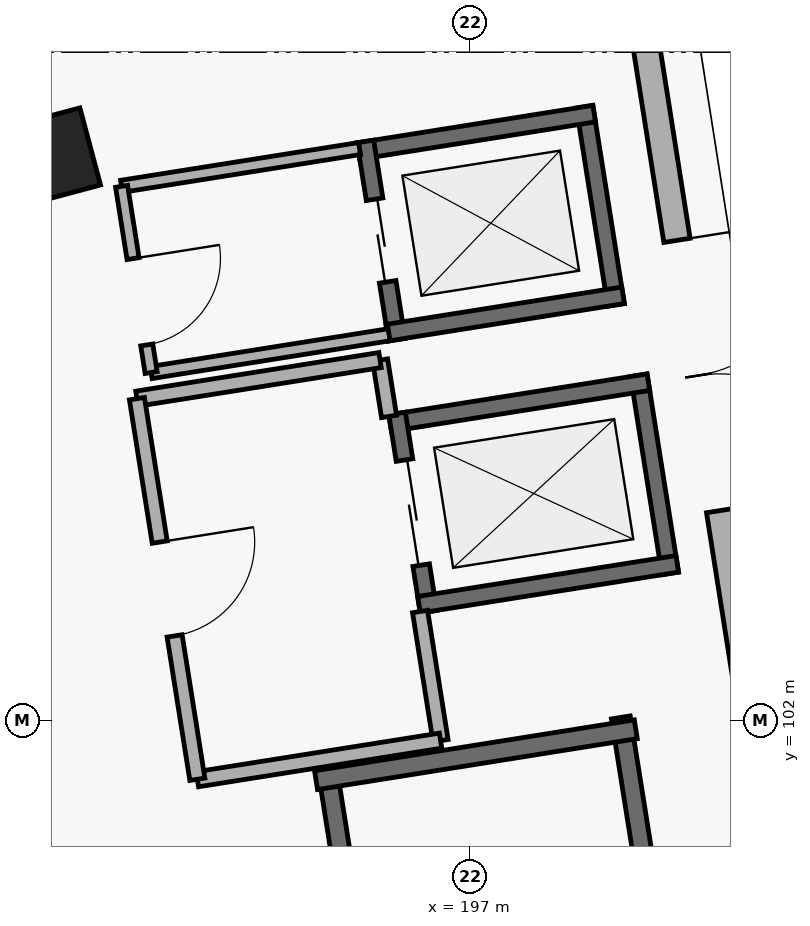
"""IFC4 building model, lengths in metres.
Left out: names, types, materials, properties, quantities, classifications, styles, units other than length and angle.
Written with IfcOpenShell. Run it as: python <this file> out.ifc"""

import sys

from ifc_helpers import new_model, si_unit, direction, frame, frame_2d, origin, origin_2d, place, context, subcontext, project, spatial, rectangle, extrude, element, fill, save


model = new_model("IFC4")
c1 = context("Model", 3, precision=1e-05, world=origin(), true_north=direction((0.0, 1.0)))
c2 = subcontext(c1, "Body", "Model", "MODEL_VIEW")
j1 = project(units=[si_unit("LENGTHUNIT", "METRE"), si_unit("PLANEANGLEUNIT", "RADIAN")], contexts=[c1])
p1 = place(None, origin())
s1 = spatial("IfcSite", under=j1, at=p1, CompositionType="ELEMENT")
p2 = place(p1, origin())
s2 = spatial("IfcBuilding", under=s1, at=p2, CompositionType="ELEMENT")
p3 = place(p2, origin())
s3 = spatial("IfcBuildingStorey", under=s2, at=p3, CompositionType="ELEMENT", Elevation=0.0)
p4 = place(p3, frame((191.496, 109.419, 0.0), z_axis=(0.0, 0.0, 1.0), x_axis=(0.965925826289, 0.258819045103, 0.0)))
e1 = element("IfcColumn", 1, at=p4, inside=s3, PredefinedType="COLUMN", context=c2, shape_type="SweptSolid", body=[
    extrude(rectangle(XDim=1.05, YDim=1.05, at=origin_2d()), origin(), (0.0, 0.0, 1.0), 5.4),
])
p5 = place(p3, frame((199.305, 110.967, 0.0), z_axis=(0.0, 0.0, 1.0), x_axis=(0.155972645656, -0.987761374932, 0.0)))
e2 = element("IfcWall", 2, at=p5, inside=s3, PredefinedType="STANDARD", context=c2, shape_type="SweptSolid", body=[
    extrude(rectangle(XDim=18.671, YDim=0.35, at=frame_2d((9.335, 0.0))), origin(), (0.0, 0.0, 1.0), 4.165),
])
p6 = place(p5, frame((15.84, 0.0, 0.0)))
e3 = element("IfcOpeningElement", 3, at=p6, cuts=e2, PredefinedType="OPENING", context=c2, shape_type="SweptSolid", body=[
    extrude(rectangle(XDim=1.95, YDim=2.25, at=frame_2d((0.975, 1.125))), frame((0.0, 0.185, 0.0), z_axis=(0.0, -1.0, 0.0), x_axis=(1.0, 0.0, 0.0)), (0.0, 0.0, 1.0), 0.37),
])
p7 = place(p5, frame((2.681, 0.0, 0.0)))
e4 = element("IfcOpeningElement", 4, at=p7, cuts=e2, PredefinedType="OPENING", context=c2, shape_type="SweptSolid", body=[
    extrude(rectangle(XDim=3.6, YDim=2.7, at=frame_2d((1.8, 1.35))), frame((0.0, 0.185, 0.0), z_axis=(0.0, -1.0, 0.0), x_axis=(1.0, 0.0, 0.0)), (0.0, 0.0, 1.0), 0.37),
])
p8 = place(p3, frame((198.984, 102.043, 0.0), z_axis=(0.0, 0.0, 1.0), x_axis=(0.157268610044, -0.987555863886, 0.0)))
e5 = element("IfcWall", 5, at=p8, inside=s3, PredefinedType="SHEAR", context=c2, shape_type="SweptSolid", body=[
    extrude(rectangle(XDim=9.55, YDim=0.25, at=frame_2d((4.775, 0.0))), origin(), (0.0, 0.0, 1.0), 5.1),
])
p9 = place(p8, frame((7.19, 0.0, 0.0)))
e6 = element("IfcOpeningElement", 6, at=p9, cuts=e5, PredefinedType="OPENING", context=c2, shape_type="SweptSolid", body=[
    extrude(rectangle(XDim=1.85, YDim=2.3, at=frame_2d((0.925, 1.15))), frame((0.0, 0.135, 0.0), z_axis=(0.0, -1.0, 0.0), x_axis=(1.0, 0.0, 0.0)), (0.0, 0.0, 1.0), 0.27),
])
p10 = place(p3, frame((195.113, 101.427, 0.0), z_axis=(0.0, 0.0, 1.0), x_axis=(0.157243678356, -0.987559833943, 0.0)))
e7 = element("IfcWall", 7, at=p10, inside=s3, PredefinedType="SHEAR", context=c2, shape_type="SweptSolid", body=[
    extrude(rectangle(XDim=9.55, YDim=0.25, at=frame_2d((4.775, 0.0))), origin(), (0.0, 0.0, 1.0), 5.1),
])
p11 = place(p3, frame((199.181, 101.887, 0.0), z_axis=(0.0, 0.0, 1.0), x_axis=(-0.987557660991, -0.157257324847, 0.0)))
e8 = element("IfcWall", 8, at=p11, inside=s3, PredefinedType="SHEAR", context=c2, shape_type="SweptSolid", body=[
    extrude(rectangle(XDim=4.26, YDim=0.25, at=frame_2d((2.13, 0.0))), origin(), (0.0, 0.0, 1.0), 5.1),
])
p12 = place(p3, frame((190.092, 105.159, 0.0), z_axis=(0.0, 0.0, 1.0), x_axis=(0.160694331821, -0.987004220721, 0.0)))
e9 = element("IfcWall", 9, at=p12, inside=s3, PredefinedType="SHEAR", context=c2, shape_type="SweptSolid", body=[
    extrude(rectangle(XDim=9.45, YDim=0.25, at=frame_2d((4.725, 0.0))), origin(), (0.0, 0.0, 1.0), 5.1),
])
p13 = place(p12, frame((7.09, 0.0, 0.0)))
e10 = element("IfcOpeningElement", 10, at=p13, cuts=e9, PredefinedType="OPENING", context=c2, shape_type="SweptSolid", body=[
    extrude(rectangle(XDim=1.85, YDim=2.3, at=frame_2d((0.925, 1.15))), frame((0.0, 0.135, 0.0), z_axis=(0.0, -1.0, 0.0), x_axis=(1.0, 0.0, 0.0)), (0.0, 0.0, 1.0), 0.27),
])
p14 = place(p3, frame((199.635, 103.937, 0.0), z_axis=(0.0, 0.0, 1.0), x_axis=(-0.156807626334, 0.987629165387, 0.0)))
e11 = element("IfcWall", 11, at=p14, inside=s3, PredefinedType="SHEAR", context=c2, shape_type="SweptSolid", body=[
    extrude(rectangle(XDim=2.641, YDim=0.22, at=frame_2d((1.32, 0.0))), origin(), (0.0, 0.0, 1.0), 5.1),
])
p15 = place(p3, frame((199.347, 106.453, 0.0), z_axis=(0.0, 0.0, 1.0), x_axis=(-0.987703627881, -0.156337914372, 0.0)))
e12 = element("IfcWall", 12, at=p15, inside=s3, PredefinedType="SHEAR", context=c2, shape_type="SweptSolid", body=[
    extrude(rectangle(XDim=3.44, YDim=0.22, at=frame_2d((1.72, 0.0))), origin(), (0.0, 0.0, 1.0), 5.1),
])
p16 = place(p3, frame((196.041, 106.041, 0.0), z_axis=(0.0, 0.0, 1.0), x_axis=(0.156807626334, -0.987629165387, 0.0)))
e13 = element("IfcWall", 13, at=p16, inside=s3, PredefinedType="SHEAR", context=c2, shape_type="SweptSolid", body=[
    extrude(rectangle(XDim=2.641, YDim=0.22, at=frame_2d((1.32, 0.0))), origin(), (0.0, 0.0, 1.0), 5.1),
])
p17 = place(p16, frame((0.62, 0.0, 0.0)))
e14 = element("IfcOpeningElement", 14, at=p17, cuts=e13, PredefinedType="OPENING", context=c2, shape_type="SweptSolid", body=[
    extrude(rectangle(XDim=1.4, YDim=2.2, at=frame_2d((0.7, 1.1))), frame((0.0, 0.12, 0.0), z_axis=(0.0, -1.0, 0.0), x_axis=(1.0, 0.0, 0.0)), (0.0, 0.0, 1.0), 0.24),
])
p18 = place(p3, frame((196.329, 103.525, 0.0), z_axis=(0.0, 0.0, 1.0), x_axis=(0.987692667337, 0.156407144619, 0.0)))
e15 = element("IfcWall", 15, at=p18, inside=s3, PredefinedType="SHEAR", context=c2, shape_type="SweptSolid", body=[
    extrude(rectangle(XDim=3.44, YDim=0.22, at=frame_2d((1.72, 0.0))), origin(), (0.0, 0.0, 1.0), 5.1),
])
p19 = place(p3, frame((195.817, 106.744, 0.0), z_axis=(0.0, 0.0, 1.0), x_axis=(0.157482870509, -0.987521719, 0.0)))
e16 = element("IfcWall", 16, at=p19, inside=s3, PredefinedType="PARTITIONING", context=c2, shape_type="SweptSolid", body=[
    extrude(rectangle(XDim=0.75, YDim=0.2, at=frame_2d((0.375, 0.0))), origin(), (0.0, 0.0, 1.0), 5.08),
])
p20 = place(p3, frame((196.343, 103.436, 0.0), z_axis=(0.0, 0.0, 1.0), x_axis=(0.156960903537, -0.987604817101, 0.0)))
e17 = element("IfcWall", 17, at=p20, inside=s3, PredefinedType="PARTITIONING", context=c2, shape_type="SweptSolid", body=[
    extrude(rectangle(XDim=1.72, YDim=0.2, at=frame_2d((0.86, 0.0))), origin(), (0.0, 0.0, 1.0), 5.08),
])
p21 = place(p3, frame((195.817, 106.744, 0.0), z_axis=(0.0, 0.0, 1.0), x_axis=(-0.987633675984, -0.156779214382, 0.0)))
e18 = element("IfcWall", 18, at=p21, inside=s3, PredefinedType="PARTITIONING", context=c2, shape_type="SweptSolid", body=[
    extrude(rectangle(XDim=3.239, YDim=0.2, at=frame_2d((1.62, 0.0))), origin(), (0.0, 0.0, 1.0), 5.08),
])
p22 = place(p3, frame((196.613, 101.737, 0.0), z_axis=(0.0, 0.0, 1.0), x_axis=(-0.987629416648, -0.156806043797, 0.0)))
e19 = element("IfcWall", 19, at=p22, inside=s3, PredefinedType="PARTITIONING", context=c2, shape_type="SweptSolid", body=[
    extrude(rectangle(XDim=3.24, YDim=0.2, at=frame_2d((1.62, 0.0))), origin(), (0.0, 0.0, 1.0), 5.08),
])
p23 = place(p3, frame((192.618, 106.236, 0.0), z_axis=(0.0, 0.0, 1.0), x_axis=(0.156842848291, -0.987623572491, 0.0)))
e20 = element("IfcWall", 20, at=p23, inside=s3, PredefinedType="PARTITIONING", context=c2, shape_type="SweptSolid", body=[
    extrude(rectangle(XDim=5.07, YDim=0.2, at=frame_2d((2.535, 0.0))), origin(), (0.0, 0.0, 1.0), 5.08),
])
p24 = place(p23, frame((1.91, 0.0, 0.0)))
e21 = element("IfcOpeningElement", 21, at=p24, cuts=e20, PredefinedType="OPENING", context=c2, shape_type="SweptSolid", body=[
    extrude(rectangle(XDim=1.25, YDim=2.2, at=frame_2d((0.625, 1.1))), frame((0.0, 0.11, 0.0), z_axis=(0.0, -1.0, 0.0), x_axis=(1.0, 0.0, 0.0)), (0.0, 0.0, 1.0), 0.22),
])
p25 = place(p3, frame((198.922, 107.47, 0.0), z_axis=(0.0, 0.0, 1.0), x_axis=(-0.156807626334, 0.987629165387, 0.0)))
e22 = element("IfcWall", 22, at=p25, inside=s3, PredefinedType="SHEAR", context=c2, shape_type="SweptSolid", body=[
    extrude(rectangle(XDim=2.641, YDim=0.22, at=frame_2d((1.32, 0.0))), origin(), (0.0, 0.0, 1.0), 5.1),
])
p26 = place(p3, frame((198.634, 109.986, 0.0), z_axis=(0.0, 0.0, 1.0), x_axis=(-0.987645460109, -0.156704962032, 0.0)))
e23 = element("IfcWall", 23, at=p26, inside=s3, PredefinedType="SHEAR", context=c2, shape_type="SweptSolid", body=[
    extrude(rectangle(XDim=3.141, YDim=0.22, at=frame_2d((1.57, 0.0))), origin(), (0.0, 0.0, 1.0), 5.1),
])
p27 = place(p3, frame((195.624, 109.62, 0.0), z_axis=(0.0, 0.0, 1.0), x_axis=(0.156793308963, -0.987631438475, 0.0)))
e24 = element("IfcWall", 24, at=p27, inside=s3, PredefinedType="SHEAR", context=c2, shape_type="SweptSolid", body=[
    extrude(rectangle(XDim=2.641, YDim=0.22, at=frame_2d((1.32, 0.0))), origin(), (0.0, 0.0, 1.0), 5.1),
])
p28 = place(p27, frame((0.77, 0.0, 0.0)))
e25 = element("IfcOpeningElement", 25, at=p28, cuts=e24, PredefinedType="OPENING", context=c2, shape_type="SweptSolid", body=[
    extrude(rectangle(XDim=1.1, YDim=2.15, at=frame_2d((0.55, 1.075))), frame((0.0, 0.12, 0.0), z_axis=(0.0, -1.0, 0.0), x_axis=(1.0, 0.0, 0.0)), (0.0, 0.0, 1.0), 0.24),
])
p29 = place(p3, frame((195.912, 107.104, 0.0), z_axis=(0.0, 0.0, 1.0), x_axis=(0.98765558045, 0.156641164471, 0.0)))
e26 = element("IfcWall", 26, at=p29, inside=s3, PredefinedType="SHEAR", context=c2, shape_type="SweptSolid", body=[
    extrude(rectangle(XDim=3.141, YDim=0.22, at=frame_2d((1.57, 0.0))), origin(), (0.0, 0.0, 1.0), 5.1),
])
p30 = place(p3, frame((195.547, 109.527, 0.0), z_axis=(0.0, 0.0, 1.0), x_axis=(-0.987632121619, -0.156789005818, 0.0)))
e27 = element("IfcWall", 27, at=p30, inside=s3, PredefinedType="PARTITIONING", context=c2, shape_type="SweptSolid", body=[
    extrude(rectangle(XDim=3.17, YDim=0.16, at=frame_2d((1.585, 0.0))), origin(), (0.0, 0.0, 1.0), 5.08),
])
p31 = place(p3, frame((195.936, 107.077, 0.0), z_axis=(0.0, 0.0, 1.0), x_axis=(-0.987644043639, -0.156713889186, 0.0)))
e28 = element("IfcWall", 28, at=p31, inside=s3, PredefinedType="PARTITIONING", context=c2, shape_type="SweptSolid", body=[
    extrude(rectangle(XDim=3.17, YDim=0.16, at=frame_2d((1.585, 0.0))), origin(), (0.0, 0.0, 1.0), 5.08),
])
p32 = place(p3, frame((192.416, 109.03, 0.0), z_axis=(0.0, 0.0, 1.0), x_axis=(0.156781258489, -0.987633351496, 0.0)))
e29 = element("IfcWall", 29, at=p32, inside=s3, PredefinedType="PARTITIONING", context=c2, shape_type="SweptSolid", body=[
    extrude(rectangle(XDim=2.481, YDim=0.16, at=frame_2d((1.24, 0.0))), origin(), (0.0, 0.0, 1.0), 5.08),
])
p33 = place(p32, frame((0.963, 0.0, 0.0)))
e30 = element("IfcOpeningElement", 30, at=p33, cuts=e29, PredefinedType="OPENING", context=c2, shape_type="SweptSolid", body=[
    extrude(rectangle(XDim=1.15, YDim=2.2, at=frame_2d((0.575, 1.1))), frame((0.0, 0.09, 0.0), z_axis=(0.0, -1.0, 0.0), x_axis=(1.0, 0.0, 0.0)), (0.0, 0.0, 1.0), 0.18),
])
p34 = place(p7, origin())
e31 = element("IfcDoor", 31, at=p34, inside=s3, OperationType="DOUBLE_DOOR_SINGLE_SWING", PredefinedType="DOOR", context=c2, shape_type="SweptSolid", body=[
    extrude(rectangle(XDim=3.6, YDim=2.7, at=frame_2d((1.8, 1.35))), frame((0.0, 0.025, 0.0), z_axis=(0.0, -1.0, 0.0), x_axis=(1.0, 0.0, 0.0)), (0.0, 0.0, 1.0), 0.05),
])
fill(e4, e31)
p35 = place(p17, origin())
e32 = element("IfcDoor", 32, at=p35, inside=s3, OperationType="SLIDING_TO_LEFT", PredefinedType="DOOR", context=c2, shape_type="SweptSolid", body=[
    extrude(rectangle(XDim=1.4, YDim=2.2, at=frame_2d((0.7, 1.1))), frame((0.0, 0.025, 0.0), z_axis=(0.0, -1.0, 0.0), x_axis=(1.0, 0.0, 0.0)), (0.0, 0.0, 1.0), 0.05),
])
fill(e14, e32)
p36 = place(p24, origin())
e33 = element("IfcDoor", 33, at=p36, inside=s3, OperationType="SINGLE_SWING_LEFT", PredefinedType="DOOR", context=c2, shape_type="SweptSolid", body=[
    extrude(rectangle(XDim=1.25, YDim=2.2, at=frame_2d((0.625, 1.1))), frame((0.0, 0.025, 0.0), z_axis=(0.0, -1.0, 0.0), x_axis=(1.0, 0.0, 0.0)), (0.0, 0.0, 1.0), 0.05),
])
fill(e21, e33)
p37 = place(p28, origin())
e34 = element("IfcDoor", 34, at=p37, inside=s3, OperationType="SLIDING_TO_LEFT", PredefinedType="DOOR", context=c2, shape_type="SweptSolid", body=[
    extrude(rectangle(XDim=1.1, YDim=2.15, at=frame_2d((0.55, 1.075))), frame((0.0, 0.025, 0.0), z_axis=(0.0, -1.0, 0.0), x_axis=(1.0, 0.0, 0.0)), (0.0, 0.0, 1.0), 0.05),
])
fill(e25, e34)
p38 = place(p33, origin())
e35 = element("IfcDoor", 35, at=p38, inside=s3, OperationType="SINGLE_SWING_LEFT", PredefinedType="DOOR", context=c2, shape_type="SweptSolid", body=[
    extrude(rectangle(XDim=1.15, YDim=2.2, at=frame_2d((0.575, 1.1))), frame((0.0, 0.025, 0.0), z_axis=(0.0, -1.0, 0.0), x_axis=(1.0, 0.0, 0.0)), (0.0, 0.0, 1.0), 0.05),
])
fill(e30, e35)
save(model, sys.argv[1])
